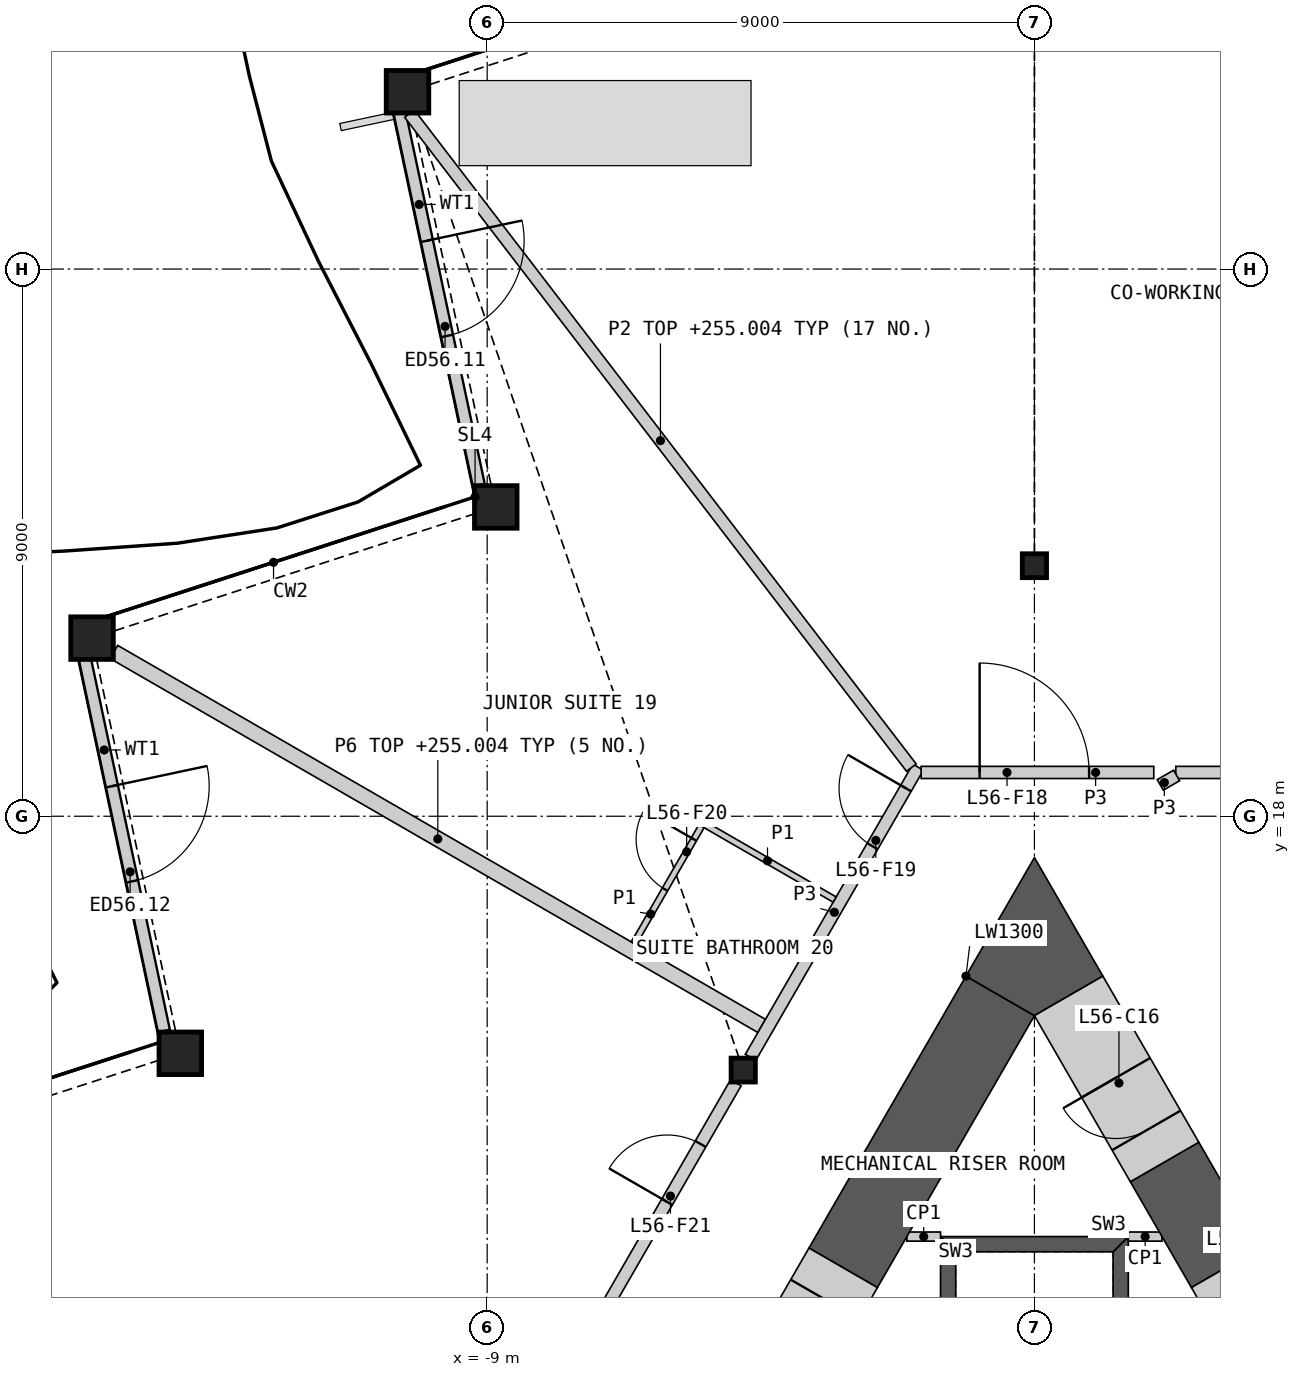
"""IFC4 building model, lengths in metres.
Left out: names, types, materials, properties, quantities, classifications, styles, units other than length and angle.
Written with IfcOpenShell. Run it as: python <this file> out.ifc"""

import sys

from ifc_helpers import new_model, si_unit, direction, frame, frame_2d, origin, origin_2d, place, context, subcontext, project, spatial, polyline, rectangle, hollow_rectangle, i_section, outline, extrude, element, fill, save


model = new_model("IFC4")
c1 = context("Model", 3, precision=1e-05, world=origin(), true_north=direction((0.0, 1.0)))
c2 = subcontext(c1, "Body", "Model", "MODEL_VIEW")
j1 = project(units=[si_unit("LENGTHUNIT", "METRE"), si_unit("PLANEANGLEUNIT", "RADIAN")], contexts=[c1])
p1 = place(None, origin())
s1 = spatial("IfcSite", under=j1, at=p1, CompositionType="ELEMENT")
p2 = place(p1, origin())
s2 = spatial("IfcBuilding", under=s1, at=p2, CompositionType="ELEMENT")
p3 = place(p2, frame((0.0, 0.0, 252.6)))
s3 = spatial("IfcBuildingStorey", under=s2, at=p3, CompositionType="ELEMENT", Elevation=252.6)
for number, where, z_axis, x_axis in (
    (1, (-10.31, 29.916, 0.0), (0.0, 0.0, 1.0), (1.0, 0.0, 0.0)),
    (2, (-8.859, 23.087, 0.0), (0.0, 0.0, 1.0), (1.0, 0.0, 0.0)),
    (3, (-15.499, 20.93, 0.0), (0.0, 0.0, 1.0), (1.0, 0.0, 0.0)),
    (4, (-14.047, 14.101, 0.0), (0.0, 0.0, 1.0), (1.0, 0.0, 0.0)),
):
    element("IfcColumn", number, at=place(p3, frame(where, z_axis=z_axis, x_axis=x_axis)), inside=s3, PredefinedType="COLUMN", context=c2, shape_type="SweptSolid", body=[
        extrude(hollow_rectangle(XDim=0.7, YDim=0.7, WallThickness=0.045, at=origin_2d()), origin(), (0.0, 0.0, 1.0), 3.6),
    ])
for number, where, z_axis, x_axis in (
    (5, (0.0, 22.121, 0.0), (0.0, 0.0, 1.0), (1.0, 0.0, 0.0)),
    (6, (-4.789, 13.825, 0.0), (0.0, 0.0, 1.0), (1.0, 0.0, 0.0)),
):
    element("IfcColumn", number, at=place(p3, frame(where, z_axis=z_axis, x_axis=x_axis)), inside=s3, PredefinedType="COLUMN", context=c2, shape_type="SweptSolid", body=[
        extrude(i_section(OverallWidth=0.399, OverallDepth=0.393, WebThickness=0.023, FlangeThickness=0.037, at=origin_2d()), origin(), (0.0, 0.0, 1.0), 3.6),
    ])
p4 = place(p3, frame((-10.446, 29.602, 0.0), z_axis=(0.0, 0.0, 1.0), x_axis=(0.207926028339, -0.97814455309, 0.0)))
e7 = element("IfcWall", 7, at=p4, inside=s3, PredefinedType="SOLIDWALL", context=c2, shape_type="SweptSolid", body=[
    extrude(rectangle(XDim=6.293, YDim=0.2, at=frame_2d((3.147, 0.0))), origin(), (0.0, 0.0, 1.0), 2.701),
])
p5 = place(p4, frame((2.184, 0.0, 0.0)))
e8 = element("IfcOpeningElement", 8, at=p5, cuts=e7, PredefinedType="OPENING", context=c2, shape_type="SweptSolid", body=[
    extrude(rectangle(XDim=1.6, YDim=2.4, at=frame_2d((0.8, 1.2))), frame((0.0, 0.11, 0.0), z_axis=(0.0, -1.0, 0.0), x_axis=(1.0, 0.0, 0.0)), (0.0, 0.0, 1.0), 0.22),
])
p6 = place(p3, frame((-15.626, 20.631, 0.0), z_axis=(0.0, 0.0, 1.0), x_axis=(0.207882853761, -0.978153729795, 0.0)))
e9 = element("IfcWall", 9, at=p6, inside=s3, PredefinedType="SOLIDWALL", context=c2, shape_type="SweptSolid", body=[
    extrude(rectangle(XDim=6.301, YDim=0.2, at=frame_2d((3.15, 0.0))), origin(), (0.0, 0.0, 1.0), 2.701),
])
p7 = place(p6, frame((2.184, 0.0, 0.0)))
e10 = element("IfcOpeningElement", 10, at=p7, cuts=e9, PredefinedType="OPENING", context=c2, shape_type="SweptSolid", body=[
    extrude(rectangle(XDim=1.6, YDim=2.4, at=frame_2d((0.8, 1.2))), frame((0.0, 0.11, 0.0), z_axis=(0.0, -1.0, 0.0), x_axis=(1.0, 0.0, 0.0)), (0.0, 0.0, 1.0), 0.22),
])
p8 = place(p3, origin())
e11 = element("IfcWall", 11, at=p8, inside=s3, PredefinedType="SHEAR", context=c2, shape_type="SweptSolid", body=[
    extrude(outline(polyline([(1.544, 5.237), (1.544, 11.087), (1.294, 10.837), (1.294, 5.237), (1.544, 5.237)])), origin(), (0.0, 0.0, 1.0), 3.25),
])
p9 = place(p3, origin())
e12 = element("IfcWall", 12, at=p9, inside=s3, PredefinedType="SHEAR", context=c2, shape_type="SweptSolid", body=[
    extrude(outline(polyline([(1.544, 11.087), (-1.544, 11.087), (-1.294, 10.837), (1.294, 10.837), (1.544, 11.087)])), origin(), (0.0, 0.0, 1.0), 3.25),
])
p10 = place(p3, origin())
e13 = element("IfcWall", 13, at=p10, inside=s3, PredefinedType="SHEAR", context=c2, shape_type="SweptSolid", body=[
    extrude(outline(polyline([(-1.294, 10.837), (-1.544, 11.087), (-1.544, 5.237), (-1.294, 5.237), (-1.294, 10.837)])), origin(), (0.0, 0.0, 1.0), 3.25),
])
for number, where, z_axis, x_axis in (
    (14, (1.544, 11.087, 0.0), (0.0, 0.0, 1.0), (1.0, 0.0, 0.0)),
    (15, (-1.544, 11.087, 0.0), (0.0, 0.0, 1.0), (-1.0, 0.0, 0.0)),
):
    element("IfcWall", number, at=place(p3, frame(where, z_axis=z_axis, x_axis=x_axis)), inside=s3, PredefinedType="PARTITIONING", context=c2, shape_type="SweptSolid", body=[
        extrude(rectangle(XDim=0.554, YDim=0.15, at=frame_2d((0.277, 0.0))), origin(), (0.0, 0.0, 1.0), 3.25),
    ])
p11 = place(p3, frame((3.145, 10.573, 0.0), z_axis=(0.0, 0.0, 1.0), x_axis=(-0.500006371327, 0.866021725266, 0.0)))
e16 = element("IfcWall", 16, at=p11, inside=s3, PredefinedType="SHEAR", context=c2, shape_type="SweptSolid", body=[
    extrude(rectangle(XDim=2.01, YDim=1.3, at=frame_2d((1.005, 0.0))), origin(), (0.0, 0.0, 1.0), 3.25),
])
p12 = place(p3, frame((-0.563, 15.045, 0.0), z_axis=(0.0, 0.0, 1.0), x_axis=(-0.499982995661, -0.866035221021, 0.0)))
e17 = element("IfcWall", 17, at=p12, inside=s3, PredefinedType="SHEAR", context=c2, shape_type="SweptSolid", body=[
    extrude(rectangle(XDim=5.164, YDim=1.3, at=frame_2d((2.582, 0.0))), origin(), (0.0, 0.0, 1.0), 3.25),
])
p13 = place(p3, origin())
e18 = element("IfcWall", 18, at=p13, inside=s3, PredefinedType="SHEAR", context=c2, shape_type="SweptSolid", body=[
    extrude(outline(polyline([(-1.126, 15.371), (0.0, 17.321), (1.126, 15.371), (0.0, 14.72), (-1.126, 15.371)])), origin(), (0.0, 0.0, 1.0), 3.25),
])
p14 = place(p3, frame((2.14, 12.313, 0.0), z_axis=(0.0, 0.0, 1.0), x_axis=(-0.499968102766, 0.866043818878, 0.0)))
e19 = element("IfcWall", 19, at=p14, inside=s3, PredefinedType="SHEAR", context=c2, shape_type="SweptSolid", body=[
    extrude(rectangle(XDim=3.155, YDim=1.3, at=frame_2d((1.577, 0.0))), origin(), (0.0, 0.0, 1.0), 3.25),
])
p15 = place(p14, frame((0.6, 0.0, 0.0)))
e20 = element("IfcOpeningElement", 20, at=p15, cuts=e19, PredefinedType="OPENING", context=c2, shape_type="SweptSolid", body=[
    extrude(rectangle(XDim=1.0, YDim=2.1, at=frame_2d((0.5, 1.05))), frame((0.0, 0.66, 0.0), z_axis=(0.0, -1.0, 0.0), x_axis=(1.0, 0.0, 0.0)), (0.0, 0.0, 1.0), 1.32),
])
p16 = place(p3, frame((4.245, 8.668, 0.0), z_axis=(0.0, 0.0, 1.0), x_axis=(-0.50002983664, 0.866008176907, 0.0)))
e21 = element("IfcWall", 21, at=p16, inside=s3, PredefinedType="SHEAR", context=c2, shape_type="SweptSolid", body=[
    extrude(rectangle(XDim=2.2, YDim=1.3, at=frame_2d((1.1, 0.0))), origin(), (0.0, 0.0, 1.0), 3.25),
])
p17 = place(p16, frame((0.6, 0.0, 0.0)))
e22 = element("IfcOpeningElement", 22, at=p17, cuts=e21, PredefinedType="OPENING", context=c2, shape_type="SweptSolid", body=[
    extrude(rectangle(XDim=1.0, YDim=2.1, at=frame_2d((0.5, 1.05))), frame((0.0, 0.66, 0.0), z_axis=(0.0, -1.0, 0.0), x_axis=(1.0, 0.0, 0.0)), (0.0, 0.0, 1.0), 1.32),
])
p18 = place(p3, frame((-3.145, 10.573, 0.0), z_axis=(0.0, 0.0, 1.0), x_axis=(-0.50002983664, -0.866008176907, 0.0)))
e23 = element("IfcWall", 23, at=p18, inside=s3, PredefinedType="SHEAR", context=c2, shape_type="SweptSolid", body=[
    extrude(rectangle(XDim=2.2, YDim=1.3, at=frame_2d((1.1, 0.0))), origin(), (0.0, 0.0, 1.0), 3.25),
])
p19 = place(p18, frame((0.6, 0.0, 0.0)))
e24 = element("IfcOpeningElement", 24, at=p19, cuts=e23, PredefinedType="OPENING", context=c2, shape_type="SweptSolid", body=[
    extrude(rectangle(XDim=1.0, YDim=2.1, at=frame_2d((0.5, 1.05))), frame((0.0, 0.66, 0.0), z_axis=(0.0, -1.0, 0.0), x_axis=(1.0, 0.0, 0.0)), (0.0, 0.0, 1.0), 1.32),
])
p20 = place(p3, frame((-15.138, 20.702, 0.0), z_axis=(0.0, 0.0, 1.0), x_axis=(0.86602627735, -0.499998486937, 0.0)))
e25 = element("IfcWall", 25, at=p20, inside=s3, PredefinedType="PARTITIONING", context=c2, shape_type="SweptSolid", body=[
    extrude(rectangle(XDim=12.301, YDim=0.25, at=frame_2d((6.15, 0.0))), origin(), (0.0, 0.0, 1.0), 2.404),
])
p21 = place(p3, frame((-9.458, 5.74, 0.0), z_axis=(0.0, 0.0, 1.0), x_axis=(0.50000207303, 0.866024206917, 0.0)))
e26 = element("IfcWall", 26, at=p21, inside=s3, PredefinedType="PARTITIONING", context=c2, shape_type="SweptSolid", body=[
    extrude(rectangle(XDim=9.095, YDim=0.2, at=frame_2d((4.547, 0.0))), origin(), (0.0, 0.0, 1.0), 3.25),
])
p22 = place(p21, frame((6.833, 0.0, 0.0)))
e27 = element("IfcOpeningElement", 27, at=p22, cuts=e26, PredefinedType="OPENING", context=c2, shape_type="SweptSolid", body=[
    extrude(rectangle(XDim=1.1, YDim=2.1, at=frame_2d((0.55, 1.05))), frame((0.0, 0.11, 0.0), z_axis=(0.0, -1.0, 0.0), x_axis=(1.0, 0.0, 0.0)), (0.0, 0.0, 1.0), 0.22),
])
p23 = place(p3, frame((-4.668, 14.035, 0.0), z_axis=(0.0, 0.0, 1.0), x_axis=(0.499984524817, 0.866034338201, 0.0)))
e28 = element("IfcWall", 28, at=p23, inside=s3, PredefinedType="PARTITIONING", context=c2, shape_type="SweptSolid", body=[
    extrude(rectangle(XDim=5.51, YDim=0.2, at=frame_2d((2.755, 0.0))), origin(), (0.0, 0.0, 1.0), 3.25),
])
p24 = place(p23, frame((4.01, 0.0, 0.0)))
e29 = element("IfcOpeningElement", 29, at=p24, cuts=e28, PredefinedType="OPENING", context=c2, shape_type="SweptSolid", body=[
    extrude(rectangle(XDim=1.1, YDim=2.1, at=frame_2d((0.55, 1.05))), frame((0.0, 0.11, 0.0), z_axis=(0.0, -1.0, 0.0), x_axis=(1.0, 0.0, 0.0)), (0.0, 0.0, 1.0), 0.22),
])
p25 = place(p3, frame((-1.863, 18.72, 0.0), z_axis=(0.0, 0.0, 1.0), x_axis=(1.0, 0.0, 0.0)))
e30 = element("IfcWall", 30, at=p25, inside=s3, PredefinedType="PARTITIONING", context=c2, shape_type="SweptSolid", body=[
    extrude(rectangle(XDim=3.826, YDim=0.2, at=frame_2d((1.913, 0.0))), origin(), (0.0, 0.0, 1.0), 3.25),
])
p26 = place(p25, frame((0.962, 0.0, 0.0)))
e31 = element("IfcOpeningElement", 31, at=p26, cuts=e30, PredefinedType="OPENING", context=c2, shape_type="SweptSolid", body=[
    extrude(rectangle(XDim=1.8, YDim=2.1, at=frame_2d((0.9, 1.05))), frame((0.0, 0.11, 0.0), z_axis=(0.0, -1.0, 0.0), x_axis=(1.0, 0.0, 0.0)), (0.0, 0.0, 1.0), 0.22),
])
p27 = place(p3, frame((2.325, 18.72, 0.0), z_axis=(0.0, 0.0, 1.0), x_axis=(1.0, 0.0, 0.0)))
e32 = element("IfcWall", 32, at=p27, inside=s3, PredefinedType="PARTITIONING", context=c2, shape_type="SweptSolid", body=[
    extrude(rectangle(XDim=3.002, YDim=0.2, at=frame_2d((1.501, 0.0))), origin(), (0.0, 0.0, 1.0), 3.25),
])
p28 = place(p3, frame((2.07, 18.515, 0.0), z_axis=(0.0, 0.0, 1.0), x_axis=(0.866054481515, 0.499949632511, 0.0)))
e33 = element("IfcWall", 33, at=p28, inside=s3, PredefinedType="PARTITIONING", context=c2, shape_type="SweptSolid", body=[
    extrude(rectangle(XDim=0.31, YDim=0.2, at=frame_2d((0.155, 0.0))), origin(), (0.0, 0.0, 1.0), 3.25),
])
p29 = place(p3, frame((-10.277, 29.556, 0.0), z_axis=(0.0, 0.0, 1.0), x_axis=(0.60876001101, -0.793354428358, 0.0)))
e34 = element("IfcWall", 34, at=p29, inside=s3, PredefinedType="PARTITIONING", context=c2, shape_type="SweptSolid", body=[
    extrude(rectangle(XDim=13.558, YDim=0.2, at=frame_2d((6.779, 0.0))), origin(), (0.0, 0.0, 1.0), 2.404),
])
p30 = place(p3, frame((-5.494, 17.905, 0.0), z_axis=(0.0, 0.0, 1.0), x_axis=(0.866030925526, -0.499990435942, 0.0)))
e35 = element("IfcWall", 35, at=p30, inside=s3, PredefinedType="PARTITIONING", context=c2, shape_type="SweptSolid", body=[
    extrude(rectangle(XDim=2.55, YDim=0.1, at=frame_2d((1.275, 0.0))), origin(), (0.0, 0.0, 1.0), 2.404),
])
p31 = place(p3, frame((-6.588, 15.909, 0.0), z_axis=(0.0, 0.0, 1.0), x_axis=(0.49999788721, 0.866026623601, 0.0)))
e36 = element("IfcWall", 36, at=p31, inside=s3, PredefinedType="PARTITIONING", context=c2, shape_type="SweptSolid", body=[
    extrude(rectangle(XDim=2.225, YDim=0.1, at=frame_2d((1.113, 0.0))), origin(), (0.0, 0.0, 1.0), 2.404),
])
p32 = place(p31, frame((1.025, 0.0, 0.0)))
e37 = element("IfcOpeningElement", 37, at=p32, cuts=e36, PredefinedType="OPENING", context=c2, shape_type="SweptSolid", body=[
    extrude(rectangle(XDim=0.95, YDim=2.1, at=frame_2d((0.475, 1.05))), frame((0.0, 0.06, 0.0), z_axis=(0.0, -1.0, 0.0), x_axis=(1.0, 0.0, 0.0)), (0.0, 0.0, 1.0), 0.12),
])
p33 = place(p5, origin())
e38 = element("IfcDoor", 38, at=p33, inside=s3, OperationType="DOUBLE_DOOR_SINGLE_SWING", PredefinedType="DOOR", context=c2, shape_type="SweptSolid", body=[
    extrude(rectangle(XDim=1.6, YDim=2.4, at=frame_2d((0.8, 1.2))), frame((0.0, 0.025, 0.0), z_axis=(0.0, -1.0, 0.0), x_axis=(1.0, 0.0, 0.0)), (0.0, 0.0, 1.0), 0.05),
])
fill(e8, e38)
p34 = place(p7, origin())
e39 = element("IfcDoor", 39, at=p34, inside=s3, OperationType="DOUBLE_DOOR_SINGLE_SWING", PredefinedType="DOOR", context=c2, shape_type="SweptSolid", body=[
    extrude(rectangle(XDim=1.6, YDim=2.4, at=frame_2d((0.8, 1.2))), frame((0.0, 0.025, 0.0), z_axis=(0.0, -1.0, 0.0), x_axis=(1.0, 0.0, 0.0)), (0.0, 0.0, 1.0), 0.05),
])
fill(e10, e39)
p35 = place(p15, origin())
e40 = element("IfcDoor", 40, at=p35, inside=s3, OperationType="SINGLE_SWING_RIGHT", PredefinedType="DOOR", context=c2, shape_type="SweptSolid", body=[
    extrude(rectangle(XDim=1.0, YDim=2.1, at=frame_2d((0.5, 1.05))), frame((0.0, 0.405, 0.0), z_axis=(0.0, -1.0, 0.0), x_axis=(1.0, 0.0, 0.0)), (0.0, 0.0, 1.0), 0.05),
])
fill(e20, e40)
p36 = place(p26, origin())
e41 = element("IfcDoor", 41, at=p36, inside=s3, OperationType="DOUBLE_DOOR_SINGLE_SWING", PredefinedType="DOOR", context=c2, shape_type="SweptSolid", body=[
    extrude(rectangle(XDim=1.8, YDim=2.1, at=frame_2d((0.9, 1.05))), frame((0.0, 0.025, 0.0), z_axis=(0.0, -1.0, 0.0), x_axis=(1.0, 0.0, 0.0)), (0.0, 0.0, 1.0), 0.05),
])
fill(e31, e41)
p37 = place(p24, origin())
e42 = element("IfcDoor", 42, at=p37, inside=s3, OperationType="SINGLE_SWING_RIGHT", PredefinedType="DOOR", context=c2, shape_type="SweptSolid", body=[
    extrude(rectangle(XDim=1.1, YDim=2.1, at=frame_2d((0.55, 1.05))), frame((0.0, 0.025, 0.0), z_axis=(0.0, -1.0, 0.0), x_axis=(1.0, 0.0, 0.0)), (0.0, 0.0, 1.0), 0.05),
])
fill(e29, e42)
p38 = place(p32, origin())
e43 = element("IfcDoor", 43, at=p38, inside=s3, OperationType="SINGLE_SWING_RIGHT", PredefinedType="DOOR", context=c2, shape_type="SweptSolid", body=[
    extrude(rectangle(XDim=0.95, YDim=2.1, at=frame_2d((0.475, 1.05))), frame((0.0, 0.025, 0.0), z_axis=(0.0, -1.0, 0.0), x_axis=(1.0, 0.0, 0.0)), (0.0, 0.0, 1.0), 0.05),
])
fill(e37, e43)
p39 = place(p22, origin())
e44 = element("IfcDoor", 44, at=p39, inside=s3, OperationType="SINGLE_SWING_LEFT", PredefinedType="DOOR", context=c2, shape_type="SweptSolid", body=[
    extrude(rectangle(XDim=1.1, YDim=2.1, at=frame_2d((0.55, 1.05))), frame((0.0, 0.025, 0.0), z_axis=(0.0, -1.0, 0.0), x_axis=(1.0, 0.0, 0.0)), (0.0, 0.0, 1.0), 0.05),
])
fill(e27, e44)
save(model, sys.argv[1])
